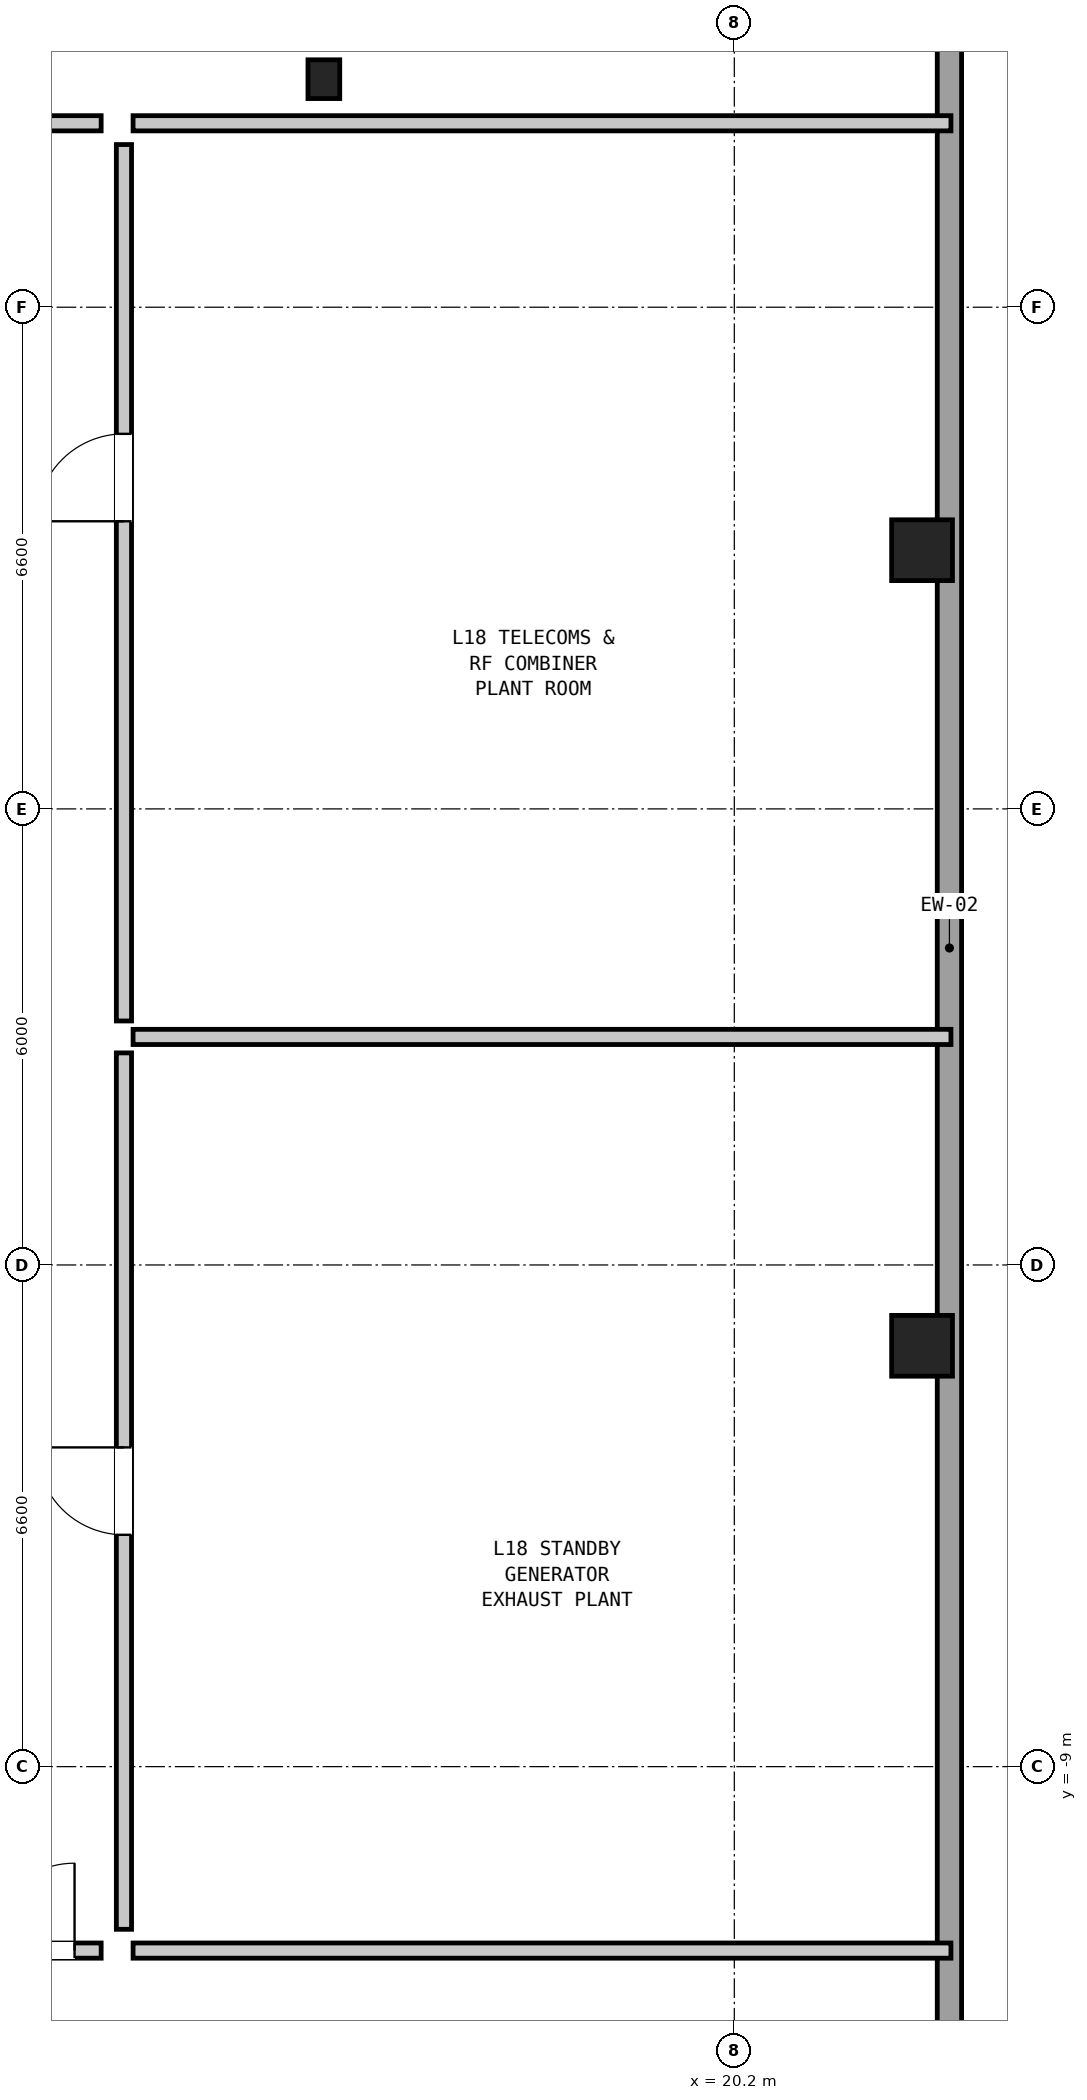
"""IFC4 building model, lengths in metres.
Left out: names, types, materials, properties, quantities, classifications, styles, units other than length and angle.
Written with IfcOpenShell. Run it as: python <this file> out.ifc"""

import sys

from ifc_helpers import new_model, si_unit, direction, frame, frame_2d, origin, origin_2d, place, context, subcontext, project, spatial, rectangle, hollow_rectangle, i_section, extrude, element, fill, save


model = new_model("IFC4")
c1 = context("Model", 3, precision=1e-05, world=origin(), true_north=direction((0.0, 1.0)))
c2 = subcontext(c1, "Body", "Model", "MODEL_VIEW")
j1 = project(units=[si_unit("LENGTHUNIT", "METRE"), si_unit("PLANEANGLEUNIT", "RADIAN")], contexts=[c1])
p1 = place(None, origin())
s1 = spatial("IfcSite", under=j1, at=p1, CompositionType="ELEMENT")
p2 = place(p1, origin())
s2 = spatial("IfcBuilding", under=s1, at=p2, CompositionType="ELEMENT")
p3 = place(p2, frame((0.0, 0.0, 65.1)))
s3 = spatial("IfcBuildingStorey", under=s2, at=p3, CompositionType="ELEMENT", Elevation=65.1)
for number, where, z_axis, x_axis in (
    (1, (22.67, -3.463, 0.0), (0.0, 0.0, 1.0), (0.0, 1.0, 0.0)),
    (2, (22.67, 7.003, 0.0), (0.0, 0.0, 1.0), (0.0, 1.0, 0.0)),
):
    element("IfcColumn", number, at=place(p3, frame(where, z_axis=z_axis, x_axis=x_axis)), inside=s3, PredefinedType="COLUMN", context=c2, shape_type="SweptSolid", body=[
        extrude(hollow_rectangle(XDim=0.8, YDim=0.8, WallThickness=0.05, at=origin_2d()), origin(), (0.0, 0.0, 1.0), 4.35),
    ])
p4 = place(p3, frame((14.8, 13.2, 0.0), z_axis=(0.0, 0.0, 1.0), x_axis=(1.0, 0.0, 0.0)))
e3 = element("IfcColumn", 3, at=p4, inside=s3, PredefinedType="COLUMN", context=c2, shape_type="SweptSolid", body=[
    extrude(i_section(OverallWidth=0.418, OverallDepth=0.51, WebThickness=0.042, FlangeThickness=0.068, at=origin_2d()), origin(), (0.0, 0.0, 1.0), 4.35),
])
p5 = place(p3, frame((23.03, 17.082, 0.0), z_axis=(0.0, 0.0, 1.0), x_axis=(0.0, -1.0, 0.0)))
e4 = element("IfcWall", 4, at=p5, inside=s3, PredefinedType="SOLIDWALL", context=c2, shape_type="SweptSolid", body=[
    extrude(rectangle(XDim=30.624, YDim=0.32, at=frame_2d((15.312, 0.0))), origin(), (0.0, 0.0, 1.0), 2.31),
])
p6 = place(p3, frame((5.98, 12.62, 0.0), z_axis=(0.0, 0.0, 1.0), x_axis=(1.0, 0.0, 0.0)))
e5 = element("IfcWall", 5, at=p6, inside=s3, PredefinedType="PARTITIONING", context=c2, shape_type="SweptSolid", body=[
    extrude(rectangle(XDim=5.89, YDim=0.2, at=frame_2d((2.945, 0.0))), origin(), (0.0, 0.0, 1.0), 4.13),
])
p7 = place(p6, frame((2.37, 0.0, 0.0)))
e6 = element("IfcOpeningElement", 6, at=p7, cuts=e5, PredefinedType="OPENING", context=c2, shape_type="SweptSolid", body=[
    extrude(rectangle(XDim=1.15, YDim=2.1, at=frame_2d((0.575, 1.05))), frame((0.0, 0.112, 0.0), z_axis=(0.0, -1.0, 0.0), x_axis=(1.0, 0.0, 0.0)), (0.0, 0.0, 1.0), 0.224),
])
p8 = place(p3, frame((5.98, -11.42, 0.0), z_axis=(0.0, 0.0, 1.0), x_axis=(1.0, 0.0, 0.0)))
e7 = element("IfcWall", 7, at=p8, inside=s3, PredefinedType="PARTITIONING", context=c2, shape_type="SweptSolid", body=[
    extrude(rectangle(XDim=5.89, YDim=0.2, at=frame_2d((2.945, 0.0))), origin(), (0.0, 0.0, 1.0), 3.574),
])
p9 = place(p8, frame((4.39, 0.0, 0.0)))
e8 = element("IfcOpeningElement", 8, at=p9, cuts=e7, PredefinedType="OPENING", context=c2, shape_type="SweptSolid", body=[
    extrude(rectangle(XDim=1.15, YDim=2.1, at=frame_2d((0.575, 1.05))), frame((0.0, 0.112, 0.0), z_axis=(0.0, -1.0, 0.0), x_axis=(1.0, 0.0, 0.0)), (0.0, 0.0, 1.0), 0.224),
])
p10 = place(p3, frame((12.29, 12.62, 0.0), z_axis=(0.0, 0.0, 1.0), x_axis=(1.0, 0.0, 0.0)))
e9 = element("IfcWall", 9, at=p10, inside=s3, PredefinedType="PARTITIONING", context=c2, shape_type="SweptSolid", body=[
    extrude(rectangle(XDim=10.76, YDim=0.2, at=frame_2d((5.38, 0.0))), origin(), (0.0, 0.0, 1.0), 4.13),
])
p11 = place(p3, frame((12.29, -11.42, 0.0), z_axis=(0.0, 0.0, 1.0), x_axis=(1.0, 0.0, 0.0)))
e10 = element("IfcWall", 10, at=p11, inside=s3, PredefinedType="PARTITIONING", context=c2, shape_type="SweptSolid", body=[
    extrude(rectangle(XDim=10.76, YDim=0.2, at=frame_2d((5.38, 0.0))), origin(), (0.0, 0.0, 1.0), 3.574),
])
p12 = place(p3, frame((12.29, 0.6, 0.0), z_axis=(0.0, 0.0, 1.0), x_axis=(1.0, 0.0, 0.0)))
e11 = element("IfcWall", 11, at=p12, inside=s3, PredefinedType="PARTITIONING", context=c2, shape_type="SweptSolid", body=[
    extrude(rectangle(XDim=10.76, YDim=0.2, at=frame_2d((5.38, 0.0))), origin(), (0.0, 0.0, 1.0), 2.31),
])
p13 = place(p3, frame((12.17, -11.14, 0.0), z_axis=(0.0, 0.0, 1.0), x_axis=(0.0, 1.0, 0.0)))
e12 = element("IfcWall", 12, at=p13, inside=s3, PredefinedType="PARTITIONING", context=c2, shape_type="SweptSolid", body=[
    extrude(rectangle(XDim=11.53, YDim=0.2, at=frame_2d((5.765, 0.0))), origin(), (0.0, 0.0, 1.0), 4.13),
])
p14 = place(p13, frame((5.19, 0.0, 0.0)))
e13 = element("IfcOpeningElement", 13, at=p14, cuts=e12, PredefinedType="OPENING", context=c2, shape_type="SweptSolid", body=[
    extrude(rectangle(XDim=1.15, YDim=2.1, at=frame_2d((0.575, 1.05))), frame((0.0, 0.112, 0.0), z_axis=(0.0, -1.0, 0.0), x_axis=(1.0, 0.0, 0.0)), (0.0, 0.0, 1.0), 0.224),
])
p15 = place(p3, frame((12.17, 0.81, 0.0), z_axis=(0.0, 0.0, 1.0), x_axis=(0.0, 1.0, 0.0)))
e14 = element("IfcWall", 14, at=p15, inside=s3, PredefinedType="PARTITIONING", context=c2, shape_type="SweptSolid", body=[
    extrude(rectangle(XDim=11.53, YDim=0.2, at=frame_2d((5.765, 0.0))), origin(), (0.0, 0.0, 1.0), 4.13),
])
p16 = place(p15, frame((6.574, 0.0, 0.0)))
e15 = element("IfcOpeningElement", 15, at=p16, cuts=e14, PredefinedType="OPENING", context=c2, shape_type="SweptSolid", body=[
    extrude(rectangle(XDim=1.15, YDim=2.1, at=frame_2d((0.575, 1.05))), frame((0.0, 0.112, 0.0), z_axis=(0.0, -1.0, 0.0), x_axis=(1.0, 0.0, 0.0)), (0.0, 0.0, 1.0), 0.224),
])
p17 = place(p9, origin())
e16 = element("IfcDoor", 16, at=p17, inside=s3, OperationType="SINGLE_SWING_RIGHT", PredefinedType="DOOR", context=c2, shape_type="SweptSolid", body=[
    extrude(rectangle(XDim=1.15, YDim=2.1, at=frame_2d((0.575, 1.05))), frame((0.0, 0.025, 0.0), z_axis=(0.0, -1.0, 0.0), x_axis=(1.0, 0.0, 0.0)), (0.0, 0.0, 1.0), 0.05),
])
fill(e8, e16)
p18 = place(p14, origin())
e17 = element("IfcDoor", 17, at=p18, inside=s3, OperationType="SINGLE_SWING_RIGHT", PredefinedType="DOOR", context=c2, shape_type="SweptSolid", body=[
    extrude(rectangle(XDim=1.15, YDim=2.1, at=frame_2d((0.575, 1.05))), frame((0.0, 0.025, 0.0), z_axis=(0.0, -1.0, 0.0), x_axis=(1.0, 0.0, 0.0)), (0.0, 0.0, 1.0), 0.05),
])
fill(e13, e17)
p19 = place(p16, origin())
e18 = element("IfcDoor", 18, at=p19, inside=s3, OperationType="SINGLE_SWING_LEFT", PredefinedType="DOOR", context=c2, shape_type="SweptSolid", body=[
    extrude(rectangle(XDim=1.15, YDim=2.1, at=frame_2d((0.575, 1.05))), frame((0.0, 0.025, 0.0), z_axis=(0.0, -1.0, 0.0), x_axis=(1.0, 0.0, 0.0)), (0.0, 0.0, 1.0), 0.05),
])
fill(e15, e18)
save(model, sys.argv[1])
